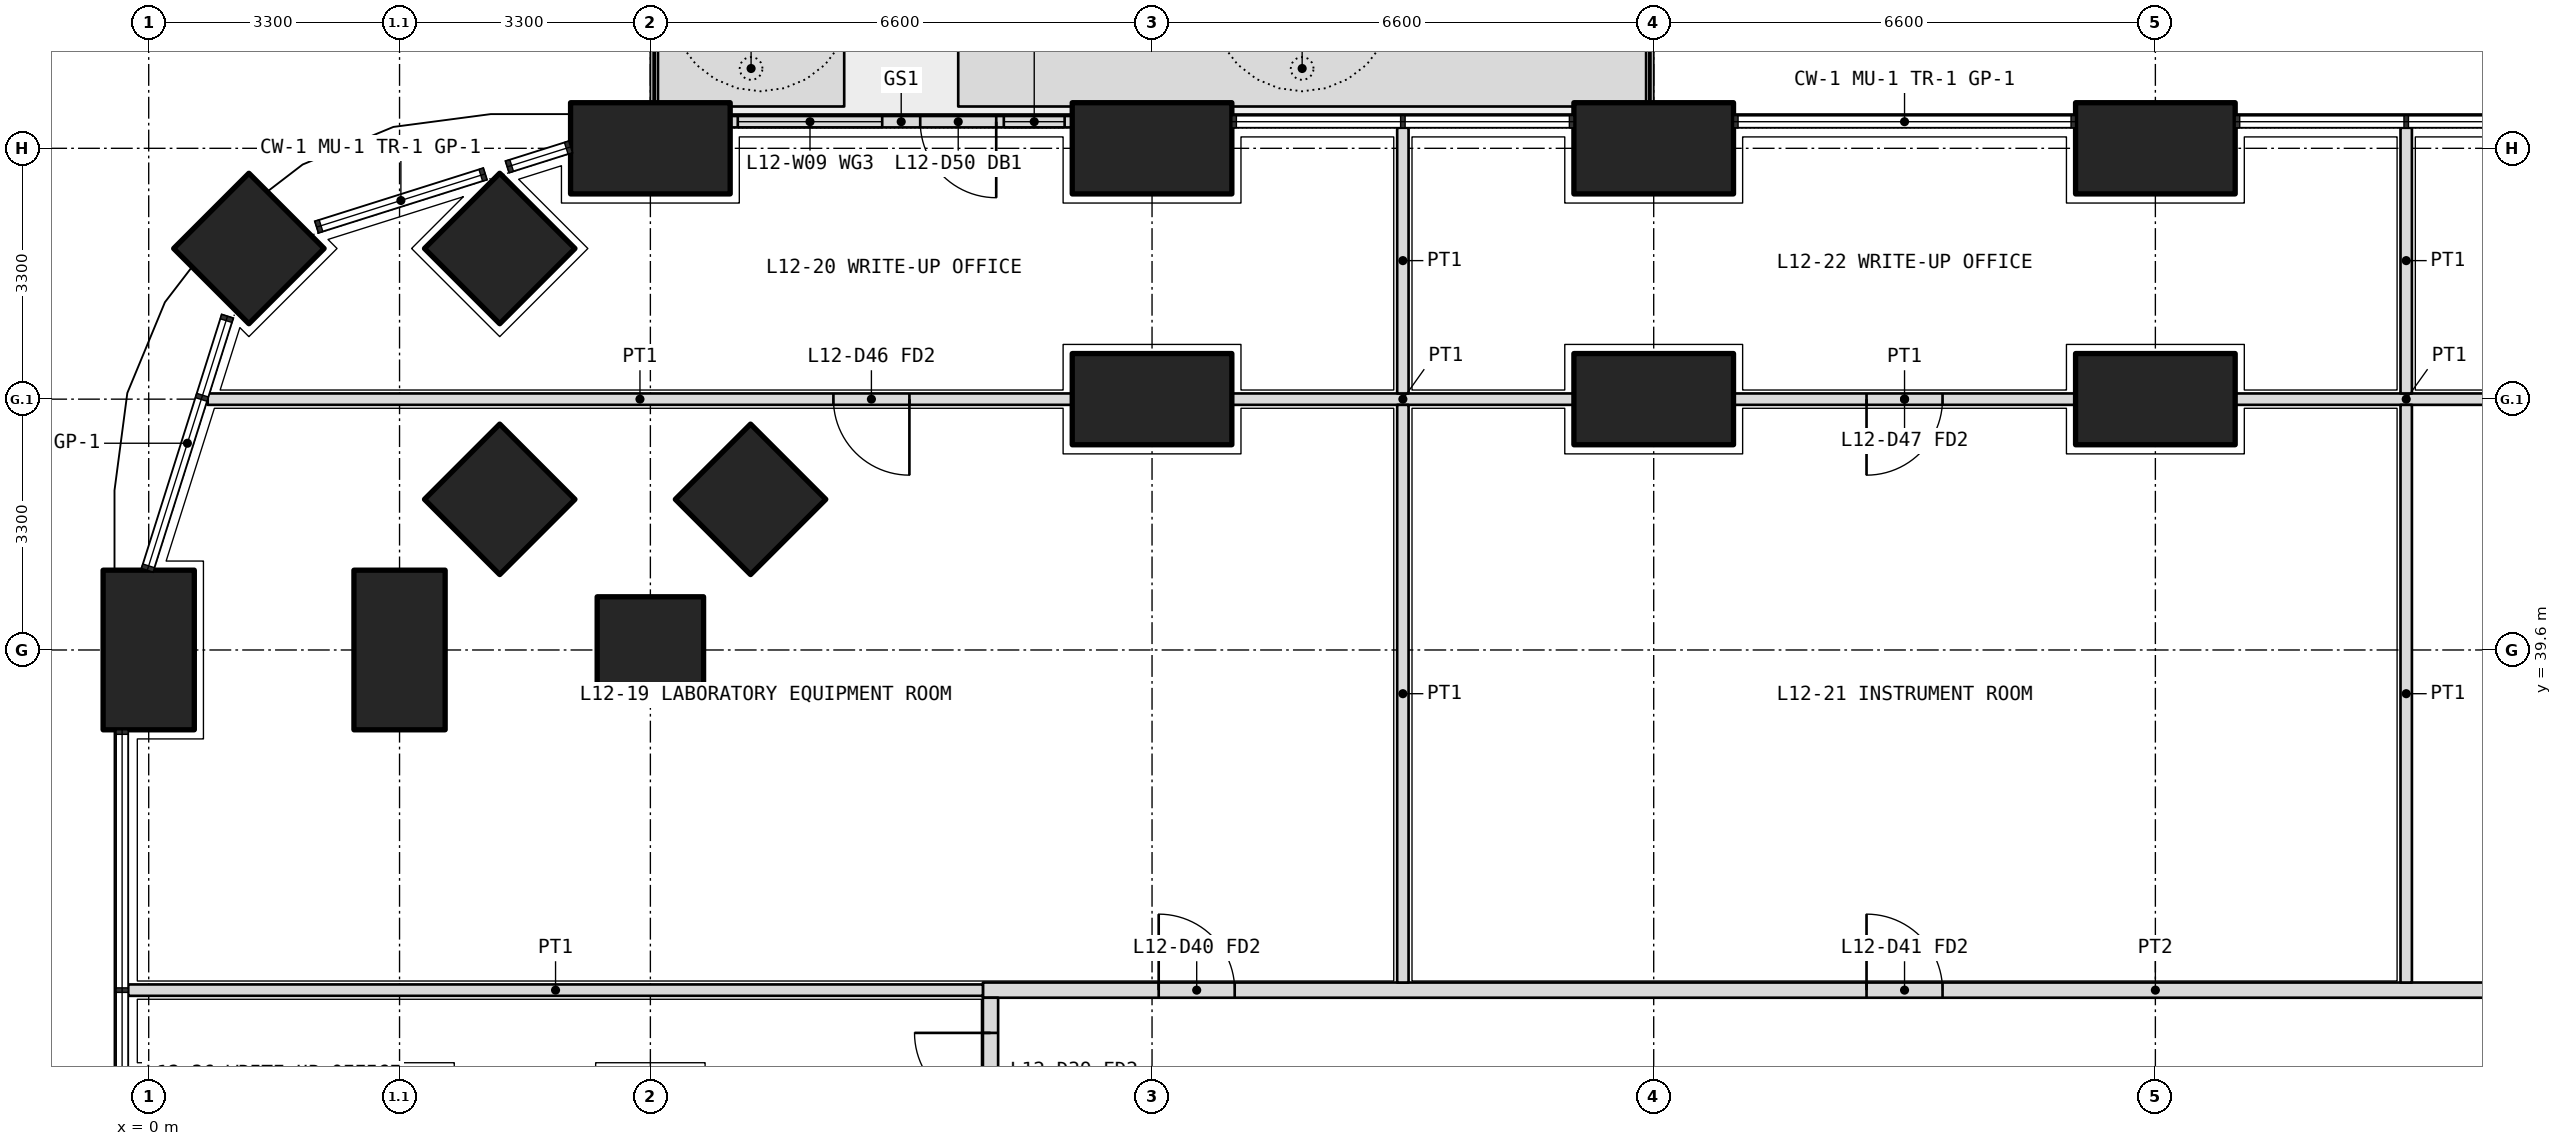
"""IFC4 building model, lengths in metres.
Left out: names, types, materials, properties, quantities, classifications, styles, units other than length and angle.
Written with IfcOpenShell. Run it as: python <this file> out.ifc"""

import sys

from ifc_helpers import new_model, si_unit, direction, frame, frame_2d, origin, origin_2d, place, context, subcontext, project, spatial, polyline, rectangle, outline, extrude, element, fill, save


model = new_model("IFC4")
c1 = context("Model", 3, precision=1e-05, world=origin(), true_north=direction((0.0, 1.0)))
c2 = subcontext(c1, "Body", "Model", "MODEL_VIEW")
j1 = project(units=[si_unit("LENGTHUNIT", "METRE"), si_unit("PLANEANGLEUNIT", "RADIAN")], contexts=[c1])
p1 = place(None, origin())
s1 = spatial("IfcSite", under=j1, at=p1, CompositionType="ELEMENT")
p2 = place(p1, origin())
s2 = spatial("IfcBuilding", under=s1, at=p2, CompositionType="ELEMENT")
p3 = place(p2, frame((0.0, 0.0, 54.9)))
s3 = spatial("IfcBuildingStorey", under=s2, at=p3, CompositionType="ELEMENT", Elevation=54.9)
p4 = place(p3, frame((1.318, 44.882, 0.0), z_axis=(0.0, 0.0, 1.0), x_axis=(0.707106781187, 0.707106781187, 0.0)))
e1 = element("IfcColumn", 1, at=p4, inside=s3, PredefinedType="COLUMN", context=c2, shape_type="SweptSolid", body=[
    extrude(rectangle(XDim=1.4, YDim=1.4, at=origin_2d()), origin(), (0.0, 0.0, 1.0), 4.2),
])
for number, where, z_axis, x_axis in (
    (2, (0.0, 39.6, 0.0), (0.0, 0.0, 1.0), (0.0, 1.0, 0.0)),
    (3, (6.6, 46.2, 0.0), (0.0, 0.0, 1.0), (1.0, 0.0, 0.0)),
    (4, (13.2, 46.2, 0.0), (0.0, 0.0, 1.0), (1.0, 0.0, 0.0)),
    (5, (19.8, 46.2, 0.0), (0.0, 0.0, 1.0), (1.0, 0.0, 0.0)),
    (6, (26.4, 46.2, 0.0), (0.0, 0.0, 1.0), (1.0, 0.0, 0.0)),
):
    element("IfcColumn", number, at=place(p3, frame(where, z_axis=z_axis, x_axis=x_axis)), inside=s3, PredefinedType="COLUMN", context=c2, shape_type="SweptSolid", body=[
        extrude(rectangle(XDim=2.1, YDim=1.2, at=origin_2d()), origin(), (0.0, 0.0, 1.0), 4.2),
    ])
for number, where, z_axis, x_axis in (
    (7, (6.6, 39.6, 0.0), (0.0, 0.0, 1.0), (1.0, 0.0, 0.0)),
    (8, (4.618, 44.882, 0.0), (0.0, 0.0, 1.0), (0.707, 0.707, 0.0)),
):
    element("IfcColumn", number, at=place(p3, frame(where, z_axis=z_axis, x_axis=x_axis)), inside=s3, PredefinedType="COLUMN", context=c2, shape_type="SweptSolid", body=[
        extrude(rectangle(XDim=1.4, YDim=1.4, at=origin_2d()), origin(), (0.0, 0.0, 1.0), 4.2),
    ])
p5 = place(p3, frame((3.3, 39.6, 0.0), z_axis=(0.0, 0.0, 1.0), x_axis=(0.0, 1.0, 0.0)))
e9 = element("IfcColumn", 9, at=p5, inside=s3, PredefinedType="COLUMN", context=c2, shape_type="SweptSolid", body=[
    extrude(rectangle(XDim=2.1, YDim=1.2, at=origin_2d()), origin(), (0.0, 0.0, 1.0), 4.2),
])
p6 = place(p3, frame((4.618, 41.582, 0.0), z_axis=(0.0, 0.0, 1.0), x_axis=(0.707106781187, 0.707106781187, 0.0)))
e10 = element("IfcColumn", 10, at=p6, inside=s3, PredefinedType="COLUMN", context=c2, shape_type="SweptSolid", body=[
    extrude(rectangle(XDim=1.4, YDim=1.4, at=origin_2d()), origin(), (0.0, 0.0, 1.0), 4.2),
])
for number, where, z_axis, x_axis in (
    (11, (13.2, 42.9, 0.0), (0.0, 0.0, 1.0), (1.0, 0.0, 0.0)),
    (12, (19.8, 42.9, 0.0), (0.0, 0.0, 1.0), (1.0, 0.0, 0.0)),
    (13, (26.4, 42.9, 0.0), (0.0, 0.0, 1.0), (1.0, 0.0, 0.0)),
):
    element("IfcColumn", number, at=place(p3, frame(where, z_axis=z_axis, x_axis=x_axis)), inside=s3, PredefinedType="COLUMN", context=c2, shape_type="SweptSolid", body=[
        extrude(rectangle(XDim=2.1, YDim=1.2, at=origin_2d()), origin(), (0.0, 0.0, 1.0), 4.2),
    ])
p7 = place(p3, frame((7.918, 41.582, 0.0), z_axis=(0.0, 0.0, 1.0), x_axis=(0.707106781187, 0.707106781187, 0.0)))
e14 = element("IfcColumn", 14, at=p7, inside=s3, PredefinedType="COLUMN", context=c2, shape_type="SweptSolid", body=[
    extrude(rectangle(XDim=1.4, YDim=1.4, at=origin_2d()), origin(), (0.0, 0.0, 1.0), 4.2),
])
p8 = place(p3, origin())
e15 = element("IfcWall", 15, at=p8, inside=s3, PredefinedType="USERDEFINED", context=c2, shape_type="SweptSolid", body=[
    extrude(outline(polyline([(6.7, 46.75), (9.15, 46.75), (9.15, 47.75), (6.7, 47.75), (6.7, 46.75)]), holes=[polyline([(6.85, 46.9), (9.0, 46.9), (9.0, 47.6), (6.85, 47.6), (6.85, 46.9)])]), origin(), (0.0, 0.0, 1.0), 1.05),
])
p9 = place(p3, origin())
e16 = element("IfcWall", 16, at=p9, inside=s3, PredefinedType="USERDEFINED", context=c2, shape_type="SweptSolid", body=[
    extrude(outline(polyline([(10.65, 46.75), (19.7, 46.75), (19.7, 47.75), (10.65, 47.75), (10.65, 46.75)]), holes=[polyline([(10.8, 46.9), (19.55, 46.9), (19.55, 47.6), (10.8, 47.6), (10.8, 46.9)])]), origin(), (0.0, 0.0, 1.0), 1.05),
])
p10 = place(p3, frame((12.15, 46.55, 0.0), z_axis=(0.0, 0.0, 1.0), x_axis=(-1.0, 0.0, 0.0)))
e17 = element("IfcWall", 17, at=p10, inside=s3, PredefinedType="SOLIDWALL", context=c2, shape_type="SweptSolid", body=[
    extrude(rectangle(XDim=4.5, YDim=0.15, at=frame_2d((2.25, 0.0))), origin(), (0.0, 0.0, 1.0), 2.7),
])
p11 = place(p10, frame((1.0, 0.0, 0.0)))
e18 = element("IfcOpeningElement", 18, at=p11, cuts=e17, PredefinedType="OPENING", context=c2, shape_type="SweptSolid", body=[
    extrude(rectangle(XDim=1.0, YDim=2.4, at=frame_2d((0.5, 1.2))), frame((0.0, 0.085, 0.0), z_axis=(0.0, -1.0, 0.0), x_axis=(1.0, 0.0, 0.0)), (0.0, 0.0, 1.0), 0.17),
])
p12 = place(p10, frame((0.1, 0.0, 0.1)))
e19 = element("IfcOpeningElement", 19, at=p12, cuts=e17, PredefinedType="OPENING", context=c2, shape_type="SweptSolid", body=[
    extrude(rectangle(XDim=0.8, YDim=2.3, at=frame_2d((0.4, 1.15))), frame((0.0, 0.085, 0.0), z_axis=(0.0, -1.0, 0.0), x_axis=(1.0, 0.0, 0.0)), (0.0, 0.0, 1.0), 0.17),
])
p13 = place(p10, frame((2.5, 0.0, 0.1)))
e20 = element("IfcOpeningElement", 20, at=p13, cuts=e17, PredefinedType="OPENING", context=c2, shape_type="SweptSolid", body=[
    extrude(rectangle(XDim=1.9, YDim=2.3, at=frame_2d((0.95, 1.15))), frame((0.0, 0.085, 0.0), z_axis=(0.0, -1.0, 0.0), x_axis=(1.0, 0.0, 0.0)), (0.0, 0.0, 1.0), 0.17),
])
p14 = place(p3, frame((10.975, 35.125, 0.0), z_axis=(0.0, 0.0, 1.0), x_axis=(1.0, 0.0, 0.0)))
e21 = element("IfcWall", 21, at=p14, inside=s3, PredefinedType="PARTITIONING", context=c2, shape_type="SweptSolid", body=[
    extrude(rectangle(XDim=30.85, YDim=0.2, at=frame_2d((15.425, 0.0))), origin(), (0.0, 0.0, 1.0), 2.85),
])
p15 = place(p14, frame((2.312, 0.0, 0.0)))
e22 = element("IfcOpeningElement", 22, at=p15, cuts=e21, PredefinedType="OPENING", context=c2, shape_type="SweptSolid", body=[
    extrude(rectangle(XDim=1.0, YDim=2.1, at=frame_2d((0.5, 1.05))), frame((0.0, 0.11, 0.0), z_axis=(0.0, -1.0, 0.0), x_axis=(1.0, 0.0, 0.0)), (0.0, 0.0, 1.0), 0.22),
])
p16 = place(p14, frame((11.625, 0.0, 0.0)))
e23 = element("IfcOpeningElement", 23, at=p16, cuts=e21, PredefinedType="OPENING", context=c2, shape_type="SweptSolid", body=[
    extrude(rectangle(XDim=1.0, YDim=2.1, at=frame_2d((0.5, 1.05))), frame((0.0, 0.11, 0.0), z_axis=(0.0, -1.0, 0.0), x_axis=(1.0, 0.0, 0.0)), (0.0, 0.0, 1.0), 0.22),
])
p17 = place(p14, frame((21.525, 0.0, 0.0)))
e24 = element("IfcOpeningElement", 24, at=p17, cuts=e21, PredefinedType="OPENING", context=c2, shape_type="SweptSolid", body=[
    extrude(rectangle(XDim=1.0, YDim=2.1, at=frame_2d((0.5, 1.05))), frame((0.0, 0.11, 0.0), z_axis=(0.0, -1.0, 0.0), x_axis=(1.0, 0.0, 0.0)), (0.0, 0.0, 1.0), 0.22),
])
p18 = place(p14, frame((26.475, 0.0, 0.0)))
e25 = element("IfcOpeningElement", 25, at=p18, cuts=e21, PredefinedType="OPENING", context=c2, shape_type="SweptSolid", body=[
    extrude(rectangle(XDim=1.0, YDim=2.1, at=frame_2d((0.5, 1.05))), frame((0.0, 0.11, 0.0), z_axis=(0.0, -1.0, 0.0), x_axis=(1.0, 0.0, 0.0)), (0.0, 0.0, 1.0), 0.22),
])
p19 = place(p14, frame((29.188, 0.0, 0.0)))
e26 = element("IfcOpeningElement", 26, at=p19, cuts=e21, PredefinedType="OPENING", context=c2, shape_type="SweptSolid", body=[
    extrude(rectangle(XDim=1.0, YDim=2.1, at=frame_2d((0.5, 1.05))), frame((0.0, 0.11, 0.0), z_axis=(0.0, -1.0, 0.0), x_axis=(1.0, 0.0, 0.0)), (0.0, 0.0, 1.0), 0.22),
])
p20 = place(p3, frame((11.075, 11.175, 0.0), z_axis=(0.0, 0.0, 1.0), x_axis=(0.0, 1.0, 0.0)))
e27 = element("IfcWall", 27, at=p20, inside=s3, PredefinedType="PARTITIONING", context=c2, shape_type="SweptSolid", body=[
    extrude(rectangle(XDim=23.85, YDim=0.2, at=frame_2d((11.925, 0.0))), origin(), (0.0, 0.0, 1.0), 2.85),
])
p21 = place(p20, frame((0.462, 0.0, 0.0)))
e28 = element("IfcOpeningElement", 28, at=p21, cuts=e27, PredefinedType="OPENING", context=c2, shape_type="SweptSolid", body=[
    extrude(rectangle(XDim=1.0, YDim=2.1, at=frame_2d((0.5, 1.05))), frame((0.0, 0.11, 0.0), z_axis=(0.0, -1.0, 0.0), x_axis=(1.0, 0.0, 0.0)), (0.0, 0.0, 1.0), 0.22),
])
p22 = place(p20, frame((2.575, 0.0, 0.0)))
e29 = element("IfcOpeningElement", 29, at=p22, cuts=e27, PredefinedType="OPENING", context=c2, shape_type="SweptSolid", body=[
    extrude(rectangle(XDim=1.0, YDim=2.1, at=frame_2d((0.5, 1.05))), frame((0.0, 0.11, 0.0), z_axis=(0.0, -1.0, 0.0), x_axis=(1.0, 0.0, 0.0)), (0.0, 0.0, 1.0), 0.22),
])
p23 = place(p20, frame((5.625, 0.0, 0.0)))
e30 = element("IfcOpeningElement", 30, at=p23, cuts=e27, PredefinedType="OPENING", context=c2, shape_type="SweptSolid", body=[
    extrude(rectangle(XDim=0.9, YDim=2.1, at=frame_2d((0.45, 1.05))), frame((0.0, 0.11, 0.0), z_axis=(0.0, -1.0, 0.0), x_axis=(1.0, 0.0, 0.0)), (0.0, 0.0, 1.0), 0.22),
])
p24 = place(p20, frame((9.425, 0.0, 0.0)))
e31 = element("IfcOpeningElement", 31, at=p24, cuts=e27, PredefinedType="OPENING", context=c2, shape_type="SweptSolid", body=[
    extrude(rectangle(XDim=0.9, YDim=2.1, at=frame_2d((0.45, 1.05))), frame((0.0, 0.11, 0.0), z_axis=(0.0, -1.0, 0.0), x_axis=(1.0, 0.0, 0.0)), (0.0, 0.0, 1.0), 0.22),
])
p25 = place(p20, frame((12.975, 0.0, 0.0)))
e32 = element("IfcOpeningElement", 32, at=p25, cuts=e27, PredefinedType="OPENING", context=c2, shape_type="SweptSolid", body=[
    extrude(rectangle(XDim=1.0, YDim=2.1, at=frame_2d((0.5, 1.05))), frame((0.0, 0.11, 0.0), z_axis=(0.0, -1.0, 0.0), x_axis=(1.0, 0.0, 0.0)), (0.0, 0.0, 1.0), 0.22),
])
p26 = place(p20, frame((18.025, 0.0, 0.0)))
e33 = element("IfcOpeningElement", 33, at=p26, cuts=e27, PredefinedType="OPENING", context=c2, shape_type="SweptSolid", body=[
    extrude(rectangle(XDim=1.0, YDim=2.1, at=frame_2d((0.5, 1.05))), frame((0.0, 0.11, 0.0), z_axis=(0.0, -1.0, 0.0), x_axis=(1.0, 0.0, 0.0)), (0.0, 0.0, 1.0), 0.22),
])
p27 = place(p20, frame((22.387, 0.0, 0.0)))
e34 = element("IfcOpeningElement", 34, at=p27, cuts=e27, PredefinedType="OPENING", context=c2, shape_type="SweptSolid", body=[
    extrude(rectangle(XDim=1.0, YDim=2.1, at=frame_2d((0.5, 1.05))), frame((0.0, 0.11, 0.0), z_axis=(0.0, -1.0, 0.0), x_axis=(1.0, 0.0, 0.0)), (0.0, 0.0, 1.0), 0.22),
])
p28 = place(p3, frame((-0.27, 35.125, 0.0), z_axis=(0.0, 0.0, 1.0), x_axis=(1.0, 0.0, 0.0)))
e35 = element("IfcWall", 35, at=p28, inside=s3, PredefinedType="PARTITIONING", context=c2, shape_type="SweptSolid", body=[
    extrude(rectangle(XDim=11.245, YDim=0.15, at=frame_2d((5.623, 0.0))), origin(), (0.0, 0.0, 1.0), 2.7),
])
p29 = place(p3, frame((31.95, 42.9, 0.0), z_axis=(0.0, 0.0, 1.0), x_axis=(-1.0, 0.0, 0.0)))
e36 = element("IfcWall", 36, at=p29, inside=s3, PredefinedType="PARTITIONING", context=c2, shape_type="SweptSolid", body=[
    extrude(rectangle(XDim=4.5, YDim=0.15, at=frame_2d((2.25, 0.0))), origin(), (0.0, 0.0, 1.0), 3.9),
])
p30 = place(p3, frame((25.35, 42.9, 0.0), z_axis=(0.0, 0.0, 1.0), x_axis=(-1.0, 0.0, 0.0)))
e37 = element("IfcWall", 37, at=p30, inside=s3, PredefinedType="PARTITIONING", context=c2, shape_type="SweptSolid", body=[
    extrude(rectangle(XDim=4.5, YDim=0.15, at=frame_2d((2.25, 0.0))), origin(), (0.0, 0.0, 1.0), 3.9),
])
p31 = place(p30, frame((1.75, 0.0, 0.0)))
e38 = element("IfcOpeningElement", 38, at=p31, cuts=e37, PredefinedType="OPENING", context=c2, shape_type="SweptSolid", body=[
    extrude(rectangle(XDim=1.0, YDim=2.1, at=frame_2d((0.5, 1.05))), frame((0.0, 0.085, 0.0), z_axis=(0.0, -1.0, 0.0), x_axis=(1.0, 0.0, 0.0)), (0.0, 0.0, 1.0), 0.17),
])
p32 = place(p3, frame((18.75, 42.9, 0.0), z_axis=(0.0, 0.0, 1.0), x_axis=(-1.0, 0.0, 0.0)))
e39 = element("IfcWall", 39, at=p32, inside=s3, PredefinedType="PARTITIONING", context=c2, shape_type="SweptSolid", body=[
    extrude(rectangle(XDim=4.5, YDim=0.15, at=frame_2d((2.25, 0.0))), origin(), (0.0, 0.0, 1.0), 3.9),
])
p33 = place(p3, frame((12.15, 42.9, 0.0), z_axis=(0.0, 0.0, 1.0), x_axis=(-1.0, 0.0, 0.0)))
e40 = element("IfcWall", 40, at=p33, inside=s3, PredefinedType="PARTITIONING", context=c2, shape_type="SweptSolid", body=[
    extrude(rectangle(XDim=11.374, YDim=0.15, at=frame_2d((5.687, 0.0))), origin(), (0.0, 0.0, 1.0), 2.7),
])
p34 = place(p33, frame((2.142, 0.0, 0.0)))
e41 = element("IfcOpeningElement", 41, at=p34, cuts=e40, PredefinedType="OPENING", context=c2, shape_type="SweptSolid", body=[
    extrude(rectangle(XDim=1.0, YDim=2.1, at=frame_2d((0.5, 1.05))), frame((0.0, 0.085, 0.0), z_axis=(0.0, -1.0, 0.0), x_axis=(1.0, 0.0, 0.0)), (0.0, 0.0, 1.0), 0.17),
])
p35 = place(p3, frame((16.5, 46.47, 0.0), z_axis=(0.0, 0.0, 1.0), x_axis=(0.0, -1.0, 0.0)))
e42 = element("IfcWall", 42, at=p35, inside=s3, PredefinedType="PARTITIONING", context=c2, shape_type="SweptSolid", body=[
    extrude(rectangle(XDim=3.495, YDim=0.15, at=frame_2d((1.748, 0.0))), origin(), (0.0, 0.0, 1.0), 2.7),
])
p36 = place(p3, frame((16.5, 42.825, 0.0), z_axis=(0.0, 0.0, 1.0), x_axis=(0.0, -1.0, 0.0)))
e43 = element("IfcWall", 43, at=p36, inside=s3, PredefinedType="PARTITIONING", context=c2, shape_type="SweptSolid", body=[
    extrude(rectangle(XDim=7.6, YDim=0.15, at=frame_2d((3.8, 0.0))), origin(), (0.0, 0.0, 1.0), 3.9),
])
p37 = place(p3, frame((29.7, 46.47, 0.0), z_axis=(0.0, 0.0, 1.0), x_axis=(0.0, -1.0, 0.0)))
e44 = element("IfcWall", 44, at=p37, inside=s3, PredefinedType="PARTITIONING", context=c2, shape_type="SweptSolid", body=[
    extrude(rectangle(XDim=3.495, YDim=0.15, at=frame_2d((1.748, 0.0))), origin(), (0.0, 0.0, 1.0), 2.7),
])
p38 = place(p3, frame((29.7, 42.825, 0.0), z_axis=(0.0, 0.0, 1.0), x_axis=(0.0, -1.0, 0.0)))
e45 = element("IfcWall", 45, at=p38, inside=s3, PredefinedType="PARTITIONING", context=c2, shape_type="SweptSolid", body=[
    extrude(rectangle(XDim=7.6, YDim=0.15, at=frame_2d((3.8, 0.0))), origin(), (0.0, 0.0, 1.0), 3.9),
])
p39 = place(p11, origin())
e46 = element("IfcDoor", 46, at=p39, inside=s3, OperationType="SINGLE_SWING_LEFT", PredefinedType="DOOR", context=c2, shape_type="SweptSolid", body=[
    extrude(rectangle(XDim=1.0, YDim=2.4, at=frame_2d((0.5, 1.2))), frame((0.0, 0.025, 0.0), z_axis=(0.0, -1.0, 0.0), x_axis=(1.0, 0.0, 0.0)), (0.0, 0.0, 1.0), 0.05),
])
fill(e18, e46)
p40 = place(p12, origin())
e47 = element("IfcWindow", 47, at=p40, inside=s3, PartitioningType="SINGLE_PANEL", PredefinedType="WINDOW", context=c2, shape_type="SweptSolid", body=[
    extrude(rectangle(XDim=0.8, YDim=2.3, at=frame_2d((0.4, 1.15))), frame((0.0, 0.03, 0.0), z_axis=(0.0, -1.0, 0.0), x_axis=(1.0, 0.0, 0.0)), (0.0, 0.0, 1.0), 0.06),
])
fill(e19, e47)
p41 = place(p13, origin())
e48 = element("IfcWindow", 48, at=p41, inside=s3, PartitioningType="SINGLE_PANEL", PredefinedType="WINDOW", context=c2, shape_type="SweptSolid", body=[
    extrude(rectangle(XDim=1.9, YDim=2.3, at=frame_2d((0.95, 1.15))), frame((0.0, 0.03, 0.0), z_axis=(0.0, -1.0, 0.0), x_axis=(1.0, 0.0, 0.0)), (0.0, 0.0, 1.0), 0.06),
])
fill(e20, e48)
p42 = place(p15, origin())
e49 = element("IfcDoor", 49, at=p42, inside=s3, OperationType="SINGLE_SWING_LEFT", PredefinedType="DOOR", context=c2, shape_type="SweptSolid", body=[
    extrude(rectangle(XDim=1.0, YDim=2.1, at=frame_2d((0.5, 1.05))), frame((0.0, 0.025, 0.0), z_axis=(0.0, -1.0, 0.0), x_axis=(1.0, 0.0, 0.0)), (0.0, 0.0, 1.0), 0.05),
])
fill(e22, e49)
p43 = place(p34, origin())
e50 = element("IfcDoor", 50, at=p43, inside=s3, OperationType="SINGLE_SWING_LEFT", PredefinedType="DOOR", context=c2, shape_type="SweptSolid", body=[
    extrude(rectangle(XDim=1.0, YDim=2.1, at=frame_2d((0.5, 1.05))), frame((0.0, 0.025, 0.0), z_axis=(0.0, -1.0, 0.0), x_axis=(1.0, 0.0, 0.0)), (0.0, 0.0, 1.0), 0.05),
])
fill(e41, e50)
p44 = place(p16, origin())
e51 = element("IfcDoor", 51, at=p44, inside=s3, OperationType="SINGLE_SWING_LEFT", PredefinedType="DOOR", context=c2, shape_type="SweptSolid", body=[
    extrude(rectangle(XDim=1.0, YDim=2.1, at=frame_2d((0.5, 1.05))), frame((0.0, 0.025, 0.0), z_axis=(0.0, -1.0, 0.0), x_axis=(1.0, 0.0, 0.0)), (0.0, 0.0, 1.0), 0.05),
])
fill(e23, e51)
p45 = place(p31, origin())
e52 = element("IfcDoor", 52, at=p45, inside=s3, OperationType="SINGLE_SWING_RIGHT", PredefinedType="DOOR", context=c2, shape_type="SweptSolid", body=[
    extrude(rectangle(XDim=1.0, YDim=2.1, at=frame_2d((0.5, 1.05))), frame((0.0, 0.025, 0.0), z_axis=(0.0, -1.0, 0.0), x_axis=(1.0, 0.0, 0.0)), (0.0, 0.0, 1.0), 0.05),
])
fill(e38, e52)
p46 = place(p27, origin())
e53 = element("IfcDoor", 53, at=p46, inside=s3, OperationType="SINGLE_SWING_RIGHT", PredefinedType="DOOR", context=c2, shape_type="SweptSolid", body=[
    extrude(rectangle(XDim=1.0, YDim=2.1, at=frame_2d((0.5, 1.05))), frame((0.0, 0.025, 0.0), z_axis=(0.0, -1.0, 0.0), x_axis=(1.0, 0.0, 0.0)), (0.0, 0.0, 1.0), 0.05),
])
fill(e34, e53)
save(model, sys.argv[1])
